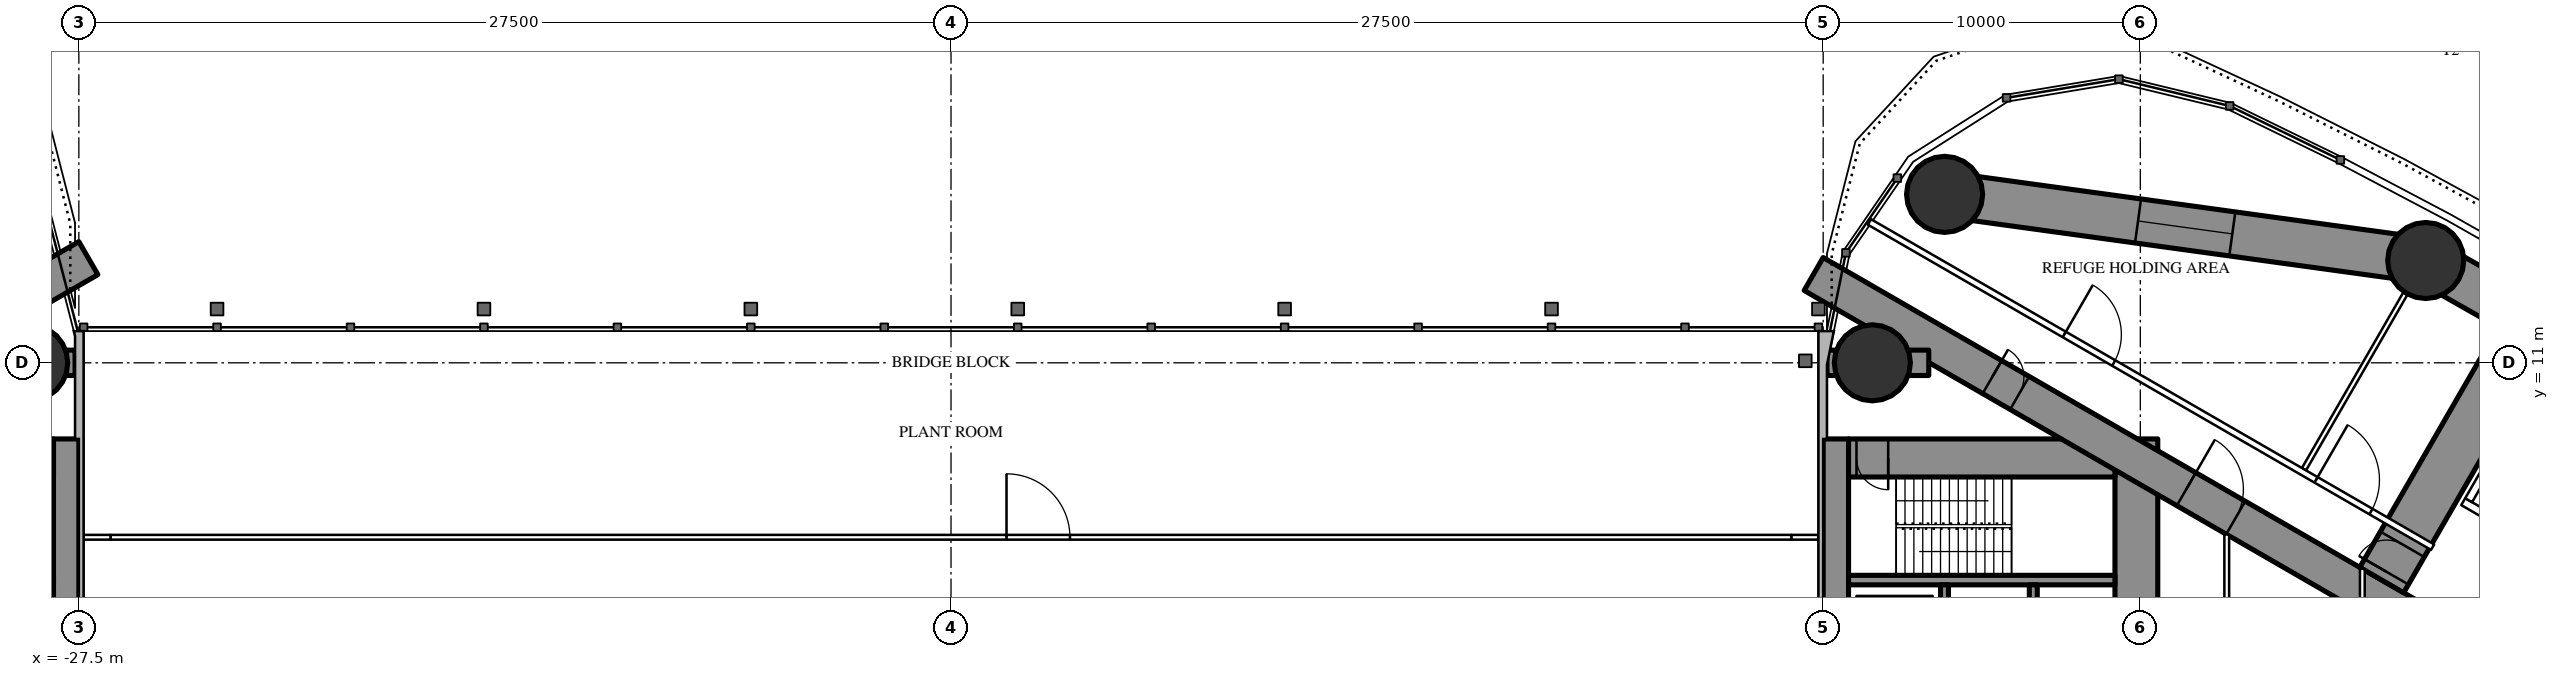
"""IFC4 building model, lengths in metres.
Left out: names, types, materials, properties, quantities, classifications, styles, units other than length and angle.
Written with IfcOpenShell. Run it as: python <this file> out.ifc"""

import sys

from ifc_helpers import new_model, si_unit, direction, frame, frame_2d, origin, origin_2d, place, context, subcontext, project, spatial, rectangle, circle, hollow_circle, extrude, element, fill, save


model = new_model("IFC4")
c1 = context("Model", 3, precision=1e-05, world=origin(), true_north=direction((0.0, 1.0)))
c2 = subcontext(c1, "Body", "Model", "MODEL_VIEW")
j1 = project(units=[si_unit("LENGTHUNIT", "METRE"), si_unit("PLANEANGLEUNIT", "RADIAN")], contexts=[c1])
p1 = place(None, origin())
s1 = spatial("IfcSite", under=j1, at=p1, CompositionType="ELEMENT")
p2 = place(p1, origin())
s2 = spatial("IfcBuilding", under=s1, at=p2, CompositionType="ELEMENT")
p3 = place(p2, frame((0.0, 0.0, 210.3)))
s3 = spatial("IfcBuildingStorey", under=s2, at=p3, CompositionType="ELEMENT", Elevation=210.3)
p4 = place(p3, frame((-29.05, 11.0, 0.0), z_axis=(0.0, 0.0, 1.0), x_axis=(1.0, 0.0, 0.0)))
e1 = element("IfcColumn", 1, at=p4, inside=s3, PredefinedType="COLUMN", context=c2, shape_type="SweptSolid", body=[
    extrude(hollow_circle(Radius=1.2, WallThickness=0.09, at=origin_2d()), origin(), (0.0, 0.0, 1.0), 5.0),
])
p5 = place(p3, frame((-27.9, 8.6, 0.0), z_axis=(0.0, 0.0, 1.0), x_axis=(0.0, -1.0, 0.0)))
e2 = element("IfcWall", 2, at=p5, inside=s3, PredefinedType="SHEAR", context=c2, shape_type="SweptSolid", body=[
    extrude(rectangle(XDim=17.2, YDim=0.8, at=frame_2d((8.6, 0.0))), origin(), (0.0, 0.0, 1.0), 5.0),
])
p6 = place(p5, frame((6.95, 0.0, 0.0)))
e3 = element("IfcOpeningElement", 3, at=p6, cuts=e2, PredefinedType="OPENING", context=c2, shape_type="SweptSolid", body=[
    extrude(rectangle(XDim=0.9, YDim=2.2, at=frame_2d((0.45, 1.1))), frame((0.0, 0.41, 0.0), z_axis=(0.0, -1.0, 0.0), x_axis=(1.0, 0.0, 0.0)), (0.0, 0.0, 1.0), 0.82),
])
p7 = place(p3, frame((-28.3, 8.0, 0.0), z_axis=(0.0, 0.0, 1.0), x_axis=(-1.0, 0.0, 0.0)))
e4 = element("IfcWall", 4, at=p7, inside=s3, PredefinedType="SHEAR", context=c2, shape_type="SweptSolid", body=[
    extrude(rectangle(XDim=8.4, YDim=1.2, at=frame_2d((4.2, 0.0))), origin(), (0.0, 0.0, 1.0), 5.0),
])
p8 = place(p7, frame((0.25, 0.0, 0.0)))
e5 = element("IfcOpeningElement", 5, at=p8, cuts=e4, PredefinedType="OPENING", context=c2, shape_type="SweptSolid", body=[
    extrude(rectangle(XDim=1.0, YDim=2.2, at=frame_2d((0.5, 1.1))), frame((0.0, 0.61, 0.0), z_axis=(0.0, -1.0, 0.0), x_axis=(1.0, 0.0, 0.0)), (0.0, 0.0, 1.0), 1.22),
])
p9 = place(p3, frame((-28.3, 4.15, 0.0), z_axis=(0.0, 0.0, 1.0), x_axis=(-1.0, 0.0, 0.0)))
e6 = element("IfcWall", 6, at=p9, inside=s3, PredefinedType="SHEAR", context=c2, shape_type="SweptSolid", body=[
    extrude(rectangle(XDim=8.4, YDim=0.3, at=frame_2d((4.2, 0.0))), origin(), (0.0, 0.0, 1.0), 5.0),
])
p10 = place(p3, frame((-27.2, 14.3, 0.0), z_axis=(0.0, 0.0, 1.0), x_axis=(-0.866026593062, -0.499997940104, 0.0)))
e7 = element("IfcWall", 7, at=p10, inside=s3, PredefinedType="SHEAR", context=c2, shape_type="SweptSolid", body=[
    extrude(rectangle(XDim=28.946, YDim=1.2, at=frame_2d((14.473, 0.0))), origin(), (0.0, 0.0, 1.0), 5.0),
])
p11 = place(p10, frame((6.5, 0.0, 0.0)))
e8 = element("IfcOpeningElement", 8, at=p11, cuts=e7, PredefinedType="OPENING", context=c2, shape_type="SweptSolid", body=[
    extrude(rectangle(XDim=1.0, YDim=2.2, at=frame_2d((0.5, 1.1))), frame((0.0, 0.61, 0.0), z_axis=(0.0, -1.0, 0.0), x_axis=(1.0, 0.0, 0.0)), (0.0, 0.0, 1.0), 1.22),
])
p12 = place(p10, frame((13.568, 0.0, 0.0)))
e9 = element("IfcOpeningElement", 9, at=p12, cuts=e7, PredefinedType="OPENING", context=c2, shape_type="SweptSolid", body=[
    extrude(rectangle(XDim=1.8, YDim=2.2, at=frame_2d((0.9, 1.1))), frame((0.0, 0.61, 0.0), z_axis=(0.0, -1.0, 0.0), x_axis=(1.0, 0.0, 0.0)), (0.0, 0.0, 1.0), 1.22),
])
p13 = place(p3, frame((-27.62, 11.0, 0.0), z_axis=(0.0, 0.0, 1.0), x_axis=(-1.0, 0.0, 0.0)))
e10 = element("IfcWall", 10, at=p13, inside=s3, PredefinedType="SHEAR", context=c2, shape_type="SweptSolid", body=[
    extrude(rectangle(XDim=4.076, YDim=0.8, at=frame_2d((2.038, 0.0))), origin(), (0.0, 0.0, 1.0), 5.0),
])
p14 = place(p3, frame((31.328, 16.311, 0.0), z_axis=(0.0, 0.0, 1.0), x_axis=(1.0, 0.0, 0.0)))
e11 = element("IfcColumn", 11, at=p14, inside=s3, PredefinedType="COLUMN", context=c2, shape_type="SweptSolid", body=[
    extrude(circle(Radius=1.2, at=origin_2d()), origin(), (0.0, 0.0, 1.0), 5.0),
])
p15 = place(p3, frame((29.05, 11.0, 0.0), z_axis=(0.0, 0.0, 1.0), x_axis=(1.0, 0.0, 0.0)))
e12 = element("IfcColumn", 12, at=p15, inside=s3, PredefinedType="COLUMN", context=c2, shape_type="SweptSolid", body=[
    extrude(hollow_circle(Radius=1.2, WallThickness=0.09, at=origin_2d()), origin(), (0.0, 0.0, 1.0), 5.0),
])
p16 = place(p3, frame((46.499, 14.226, 0.0), z_axis=(0.0, 0.0, 1.0), x_axis=(1.0, 0.0, 0.0)))
e13 = element("IfcColumn", 13, at=p16, inside=s3, PredefinedType="COLUMN", context=c2, shape_type="SweptSolid", body=[
    extrude(circle(Radius=1.2, at=origin_2d()), origin(), (0.0, 0.0, 1.0), 5.0),
])
p17 = place(p3, frame((27.9, -8.6, 0.0), z_axis=(0.0, 0.0, 1.0), x_axis=(0.0, 1.0, 0.0)))
e14 = element("IfcWall", 14, at=p17, inside=s3, PredefinedType="SHEAR", context=c2, shape_type="SweptSolid", body=[
    extrude(rectangle(XDim=17.2, YDim=0.8, at=frame_2d((8.6, 0.0))), origin(), (0.0, 0.0, 1.0), 5.0),
])
p18 = place(p17, frame((9.35, 0.0, 0.0)))
e15 = element("IfcOpeningElement", 15, at=p18, cuts=e14, PredefinedType="OPENING", context=c2, shape_type="SweptSolid", body=[
    extrude(rectangle(XDim=0.9, YDim=2.2, at=frame_2d((0.45, 1.1))), frame((0.0, 0.41, 0.0), z_axis=(0.0, -1.0, 0.0), x_axis=(1.0, 0.0, 0.0)), (0.0, 0.0, 1.0), 0.82),
])
p19 = place(p3, frame((37.375, -8.6, 0.0), z_axis=(0.0, 0.0, 1.0), x_axis=(0.0, 1.0, 0.0)))
e16 = element("IfcWall", 16, at=p19, inside=s3, PredefinedType="SHEAR", context=c2, shape_type="SweptSolid", body=[
    extrude(rectangle(XDim=17.2, YDim=1.35, at=frame_2d((8.6, 0.0))), origin(), (0.0, 0.0, 1.0), 5.0),
])
p20 = place(p19, frame((7.7, 0.0, 0.0)))
e17 = element("IfcOpeningElement", 17, at=p20, cuts=e16, PredefinedType="OPENING", context=c2, shape_type="SweptSolid", body=[
    extrude(rectangle(XDim=1.8, YDim=2.2, at=frame_2d((0.9, 1.1))), frame((0.0, 0.685, 0.0), z_axis=(0.0, -1.0, 0.0), x_axis=(1.0, 0.0, 0.0)), (0.0, 0.0, 1.0), 1.37),
])
p21 = place(p3, frame((28.3, 8.0, 0.0), z_axis=(0.0, 0.0, 1.0), x_axis=(1.0, 0.0, 0.0)))
e18 = element("IfcWall", 18, at=p21, inside=s3, PredefinedType="SHEAR", context=c2, shape_type="SweptSolid", body=[
    extrude(rectangle(XDim=8.4, YDim=1.2, at=frame_2d((4.2, 0.0))), origin(), (0.0, 0.0, 1.0), 5.0),
])
p22 = place(p21, frame((0.25, 0.0, 0.0)))
e19 = element("IfcOpeningElement", 19, at=p22, cuts=e18, PredefinedType="OPENING", context=c2, shape_type="SweptSolid", body=[
    extrude(rectangle(XDim=1.0, YDim=2.2, at=frame_2d((0.5, 1.1))), frame((0.0, 0.61, 0.0), z_axis=(0.0, -1.0, 0.0), x_axis=(1.0, 0.0, 0.0)), (0.0, 0.0, 1.0), 1.22),
])
p23 = place(p3, frame((28.3, 4.15, 0.0), z_axis=(0.0, 0.0, 1.0), x_axis=(1.0, 0.0, 0.0)))
e20 = element("IfcWall", 20, at=p23, inside=s3, PredefinedType="SHEAR", context=c2, shape_type="SweptSolid", body=[
    extrude(rectangle(XDim=8.4, YDim=0.3, at=frame_2d((4.2, 0.0))), origin(), (0.0, 0.0, 1.0), 5.0),
])
p24 = place(p3, frame((31.325, 1.9, 0.0), z_axis=(0.0, 0.0, 1.0), x_axis=(0.0, 1.0, 0.0)))
e21 = element("IfcWall", 21, at=p24, inside=s3, PredefinedType="SHEAR", context=c2, shape_type="SweptSolid", body=[
    extrude(rectangle(XDim=2.1, YDim=0.25, at=frame_2d((1.05, 0.0))), origin(), (0.0, 0.0, 1.0), 5.0),
])
p25 = place(p24, frame((0.5, 0.0, 0.0)))
e22 = element("IfcOpeningElement", 22, at=p25, cuts=e21, PredefinedType="OPENING", context=c2, shape_type="SweptSolid", body=[
    extrude(rectangle(XDim=1.1, YDim=2.2, at=frame_2d((0.55, 1.1))), frame((0.0, 0.135, 0.0), z_axis=(0.0, -1.0, 0.0), x_axis=(1.0, 0.0, 0.0)), (0.0, 0.0, 1.0), 0.27),
])
p26 = place(p3, frame((34.125, 1.65, 0.0), z_axis=(0.0, 0.0, 1.0), x_axis=(0.0, 1.0, 0.0)))
e23 = element("IfcWall", 23, at=p26, inside=s3, PredefinedType="SHEAR", context=c2, shape_type="SweptSolid", body=[
    extrude(rectangle(XDim=2.35, YDim=0.25, at=frame_2d((1.175, 0.0))), origin(), (0.0, 0.0, 1.0), 5.0),
])
p27 = place(p3, frame((27.2, 13.8, 0.0), z_axis=(0.0, 0.0, 1.0), x_axis=(0.866024515034, -0.500001539357, 0.0)))
e24 = element("IfcWall", 24, at=p27, inside=s3, PredefinedType="SHEAR", context=c2, shape_type="SweptSolid", body=[
    extrude(rectangle(XDim=26.907, YDim=1.2, at=frame_2d((13.454, 0.0))), origin(), (0.0, 0.0, 1.0), 5.0),
])
p28 = place(p27, frame((6.5, 0.0, 0.0)))
e25 = element("IfcOpeningElement", 25, at=p28, cuts=e24, PredefinedType="OPENING", context=c2, shape_type="SweptSolid", body=[
    extrude(rectangle(XDim=1.0, YDim=2.2, at=frame_2d((0.5, 1.1))), frame((0.0, 0.61, 0.0), z_axis=(0.0, -1.0, 0.0), x_axis=(1.0, 0.0, 0.0)), (0.0, 0.0, 1.0), 1.22),
])
p29 = place(p27, frame((13.568, 0.0, 0.0)))
e26 = element("IfcOpeningElement", 26, at=p29, cuts=e24, PredefinedType="OPENING", context=c2, shape_type="SweptSolid", body=[
    extrude(rectangle(XDim=1.8, YDim=2.2, at=frame_2d((0.9, 1.1))), frame((0.0, 0.61, 0.0), z_axis=(0.0, -1.0, 0.0), x_axis=(1.0, 0.0, 0.0)), (0.0, 0.0, 1.0), 1.22),
])
p30 = place(p3, frame((27.62, 11.0, 0.0), z_axis=(0.0, 0.0, 1.0), x_axis=(1.0, 0.0, 0.0)))
e27 = element("IfcWall", 27, at=p30, inside=s3, PredefinedType="SHEAR", context=c2, shape_type="SweptSolid", body=[
    extrude(rectangle(XDim=3.209, YDim=0.8, at=frame_2d((1.605, 0.0))), origin(), (0.0, 0.0, 1.0), 5.0),
])
p31 = place(p3, frame((45.111, 4.152, 0.0), z_axis=(0.0, 0.0, 1.0), x_axis=(0.499986466662, 0.86603321712, 0.0)))
e28 = element("IfcWall", 28, at=p31, inside=s3, PredefinedType="SHEAR", context=c2, shape_type="SweptSolid", body=[
    extrude(rectangle(XDim=9.446, YDim=1.6, at=frame_2d((4.723, 0.0))), origin(), (0.0, 0.0, 1.0), 5.0),
])
p32 = place(p31, frame((0.3, 0.0, 0.0)))
e29 = element("IfcOpeningElement", 29, at=p32, cuts=e28, PredefinedType="OPENING", context=c2, shape_type="SweptSolid", body=[
    extrude(rectangle(XDim=1.0, YDim=2.2, at=frame_2d((0.5, 1.1))), frame((0.0, 0.81, 0.0), z_axis=(0.0, -1.0, 0.0), x_axis=(1.0, 0.0, 0.0)), (0.0, 0.0, 1.0), 1.62),
])
p33 = place(p3, frame((49.834, 12.332, 0.0), z_axis=(0.0, 0.0, 1.0), x_axis=(-0.869560321562, 0.493826738001, 0.0)))
e30 = element("IfcWall", 30, at=p33, inside=s3, PredefinedType="SHEAR", context=c2, shape_type="SweptSolid", body=[
    extrude(rectangle(XDim=3.835, YDim=1.4, at=frame_2d((1.917, 0.0))), origin(), (0.0, 0.0, 1.0), 5.0),
])
p34 = place(p3, frame((46.499, 14.226, 0.0), z_axis=(0.0, 0.0, 1.0), x_axis=(-0.990685830783, 0.13616748762, 0.0)))
e31 = element("IfcWall", 31, at=p34, inside=s3, PredefinedType="SHEAR", context=c2, shape_type="SweptSolid", body=[
    extrude(rectangle(XDim=15.313, YDim=1.4, at=frame_2d((7.657, 0.0))), origin(), (0.0, 0.0, 1.0), 5.0),
])
p35 = place(p34, frame((6.157, 0.0, 0.6)))
e32 = element("IfcOpeningElement", 32, at=p35, cuts=e31, PredefinedType="OPENING", context=c2, shape_type="SweptSolid", body=[
    extrude(rectangle(XDim=3.0, YDim=1.2, at=frame_2d((1.5, 0.6))), frame((0.0, 0.71, 0.0), z_axis=(0.0, -1.0, 0.0), x_axis=(1.0, 0.0, 0.0)), (0.0, 0.0, 1.0), 1.42),
])
p36 = place(p3, frame((42.66, 7.646, 0.0), z_axis=(0.0, 0.0, 1.0), x_axis=(0.499996592859, 0.866027370889, 0.0)))
e33 = element("IfcWall", 33, at=p36, inside=s3, PredefinedType="PARTITIONING", context=c2, shape_type="SweptSolid", body=[
    extrude(rectangle(XDim=6.398, YDim=0.15, at=frame_2d((3.199, 0.0))), origin(), (0.0, 0.0, 1.0), 3.85),
])
p37 = place(p3, frame((28.959, 15.44, 0.0), z_axis=(0.0, 0.0, 1.0), x_axis=(0.866028936079, -0.499993881836, 0.0)))
e34 = element("IfcWall", 34, at=p37, inside=s3, PredefinedType="PARTITIONING", context=c2, shape_type="SweptSolid", body=[
    extrude(rectangle(XDim=20.503, YDim=0.2, at=frame_2d((10.251, 0.0))), origin(), (0.0, 0.0, 1.0), 4.75),
])
p38 = place(p37, frame((16.26, 0.0, 0.0)))
e35 = element("IfcOpeningElement", 35, at=p38, cuts=e34, PredefinedType="OPENING", context=c2, shape_type="SweptSolid", body=[
    extrude(rectangle(XDim=2.0, YDim=2.4, at=frame_2d((1.0, 1.2))), frame((0.0, 0.11, 0.0), z_axis=(0.0, -1.0, 0.0), x_axis=(1.0, 0.0, 0.0)), (0.0, 0.0, 1.0), 0.22),
])
p39 = place(p37, frame((7.094, 0.0, 0.0)))
e36 = element("IfcOpeningElement", 36, at=p39, cuts=e34, PredefinedType="OPENING", context=c2, shape_type="SweptSolid", body=[
    extrude(rectangle(XDim=1.8, YDim=2.2, at=frame_2d((0.9, 1.1))), frame((0.0, 0.11, 0.0), z_axis=(0.0, -1.0, 0.0), x_axis=(1.0, 0.0, 0.0)), (0.0, 0.0, 1.0), 0.22),
])
p40 = place(p3, frame((40.225, -5.587, 0.0), z_axis=(0.0, 0.0, 1.0), x_axis=(0.0, 1.0, 0.0)))
e37 = element("IfcWall", 37, at=p40, inside=s3, PredefinedType="PARTITIONING", context=c2, shape_type="SweptSolid", body=[
    extrude(rectangle(XDim=11.174, YDim=0.15, at=frame_2d((5.587, 0.0))), origin(), (0.0, 0.0, 1.0), 4.75),
])
p41 = place(p40, frame((4.687, 0.0, 0.0)))
e38 = element("IfcOpeningElement", 38, at=p41, cuts=e37, PredefinedType="OPENING", context=c2, shape_type="SweptSolid", body=[
    extrude(rectangle(XDim=1.8, YDim=2.2, at=frame_2d((0.9, 1.1))), frame((0.0, 0.085, 0.0), z_axis=(0.0, -1.0, 0.0), x_axis=(1.0, 0.0, 0.0)), (0.0, 0.0, 1.0), 0.17),
])
p42 = place(p3, frame((44.5, -4.505, 0.0), z_axis=(0.0, 0.0, 1.0), x_axis=(0.0, 1.0, 0.0)))
e39 = element("IfcWall", 39, at=p42, inside=s3, PredefinedType="PARTITIONING", context=c2, shape_type="SweptSolid", body=[
    extrude(rectangle(XDim=9.009, YDim=0.15, at=frame_2d((4.505, 0.0))), origin(), (0.0, 0.0, 1.0), 4.75),
])
p43 = place(p42, frame((4.005, 0.0, 0.0)))
e40 = element("IfcOpeningElement", 40, at=p43, cuts=e39, PredefinedType="OPENING", context=c2, shape_type="SweptSolid", body=[
    extrude(rectangle(XDim=1.0, YDim=2.2, at=frame_2d((0.5, 1.1))), frame((0.0, 0.085, 0.0), z_axis=(0.0, -1.0, 0.0), x_axis=(1.0, 0.0, 0.0)), (0.0, 0.0, 1.0), 0.17),
])
p44 = place(p3, frame((-26.5, 5.5, 0.0), z_axis=(0.0, 0.0, 1.0), x_axis=(1.0, 0.0, 0.0)))
e41 = element("IfcWall", 41, at=p44, inside=s3, PredefinedType="PARTITIONING", context=c2, shape_type="SweptSolid", body=[
    extrude(rectangle(XDim=53.0, YDim=0.15, at=frame_2d((26.5, 0.0))), origin(), (0.0, 0.0, 1.0), 4.03),
])
p45 = place(p44, frame((28.25, 0.0, 0.0)))
e42 = element("IfcOpeningElement", 42, at=p45, cuts=e41, PredefinedType="OPENING", context=c2, shape_type="SweptSolid", body=[
    extrude(rectangle(XDim=2.0, YDim=2.4, at=frame_2d((1.0, 1.2))), frame((0.0, 0.085, 0.0), z_axis=(0.0, -1.0, 0.0), x_axis=(1.0, 0.0, 0.0)), (0.0, 0.0, 1.0), 0.17),
])
for number, where, z_axis, x_axis in (
    (43, (-27.35, 5.5, 0.0), (0.0, 0.0, 1.0), (1.0, 0.0, 0.0)),
    (44, (26.5, 5.5, 0.0), (0.0, 0.0, 1.0), (1.0, 0.0, 0.0)),
):
    element("IfcWall", number, at=place(p3, frame(where, z_axis=z_axis, x_axis=x_axis)), inside=s3, PredefinedType="PARTITIONING", context=c2, shape_type="SweptSolid", body=[
        extrude(rectangle(XDim=0.85, YDim=0.15, at=frame_2d((0.425, 0.0))), origin(), (0.0, 0.0, 1.0), 3.8),
    ])
p46 = place(p3, frame((47.681, 6.622, 0.0), z_axis=(0.0, 0.0, 1.0), x_axis=(0.86603344179, -0.499986077507, 0.0)))
e45 = element("IfcWall", 45, at=p46, inside=s3, PredefinedType="PARTITIONING", context=c2, shape_type="SweptSolid", body=[
    extrude(rectangle(XDim=6.6, YDim=0.25, at=frame_2d((3.3, 0.0))), origin(), (0.0, 0.0, 1.0), 4.75),
])
p47 = place(p3, frame((47.852, 6.668, 0.0), z_axis=(0.0, 0.0, 1.0), x_axis=(0.499929347863, 0.866066190972, 0.0)))
e46 = element("IfcWall", 46, at=p47, inside=s3, PredefinedType="PARTITIONING", context=c2, shape_type="SweptSolid", body=[
    extrude(rectangle(XDim=3.201, YDim=0.25, at=frame_2d((1.6, 0.0))), origin(), (0.0, 0.0, 1.0), 4.75),
])
p48 = place(p35, origin())
e47 = element("IfcWindow", 47, at=p48, inside=s3, PartitioningType="SINGLE_PANEL", PredefinedType="WINDOW", context=c2, shape_type="SweptSolid", body=[
    extrude(rectangle(XDim=3.0, YDim=1.2, at=frame_2d((1.5, 0.6))), frame((0.0, 0.03, 0.0), z_axis=(0.0, -1.0, 0.0), x_axis=(1.0, 0.0, 0.0)), (0.0, 0.0, 1.0), 0.06),
])
fill(e32, e47)
p49 = place(p32, origin())
e48 = element("IfcDoor", 48, at=p49, inside=s3, OperationType="SINGLE_SWING_LEFT", PredefinedType="DOOR", context=c2, shape_type="SweptSolid", body=[
    extrude(rectangle(XDim=1.0, YDim=2.2, at=frame_2d((0.5, 1.1))), frame((0.0, 0.025, 0.0), z_axis=(0.0, -1.0, 0.0), x_axis=(1.0, 0.0, 0.0)), (0.0, 0.0, 1.0), 0.05),
])
fill(e29, e48)
p50 = place(p38, origin())
e49 = element("IfcDoor", 49, at=p50, inside=s3, OperationType="DOUBLE_DOOR_SINGLE_SWING", PredefinedType="DOOR", context=c2, shape_type="SweptSolid", body=[
    extrude(rectangle(XDim=2.0, YDim=2.4, at=frame_2d((1.0, 1.2))), frame((0.0, 0.025, 0.0), z_axis=(0.0, -1.0, 0.0), x_axis=(1.0, 0.0, 0.0)), (0.0, 0.0, 1.0), 0.05),
])
fill(e35, e49)
p51 = place(p39, origin())
e50 = element("IfcDoor", 50, at=p51, inside=s3, OperationType="DOUBLE_DOOR_SINGLE_SWING", PredefinedType="DOOR", context=c2, shape_type="SweptSolid", body=[
    extrude(rectangle(XDim=1.8, YDim=2.2, at=frame_2d((0.9, 1.1))), frame((0.0, 0.025, 0.0), z_axis=(0.0, -1.0, 0.0), x_axis=(1.0, 0.0, 0.0)), (0.0, 0.0, 1.0), 0.05),
])
fill(e36, e50)
p52 = place(p28, origin())
e51 = element("IfcDoor", 51, at=p52, inside=s3, OperationType="SINGLE_SWING_LEFT", PredefinedType="DOOR", context=c2, shape_type="SweptSolid", body=[
    extrude(rectangle(XDim=1.0, YDim=2.2, at=frame_2d((0.5, 1.1))), frame((0.0, 0.025, 0.0), z_axis=(0.0, -1.0, 0.0), x_axis=(1.0, 0.0, 0.0)), (0.0, 0.0, 1.0), 0.05),
])
fill(e25, e51)
p53 = place(p29, origin())
e52 = element("IfcDoor", 52, at=p53, inside=s3, OperationType="DOUBLE_DOOR_SINGLE_SWING", PredefinedType="DOOR", context=c2, shape_type="SweptSolid", body=[
    extrude(rectangle(XDim=1.8, YDim=2.2, at=frame_2d((0.9, 1.1))), frame((0.0, 0.025, 0.0), z_axis=(0.0, -1.0, 0.0), x_axis=(1.0, 0.0, 0.0)), (0.0, 0.0, 1.0), 0.05),
])
fill(e26, e52)
p54 = place(p22, origin())
e53 = element("IfcDoor", 53, at=p54, inside=s3, OperationType="SINGLE_SWING_RIGHT", PredefinedType="DOOR", context=c2, shape_type="SweptSolid", body=[
    extrude(rectangle(XDim=1.0, YDim=2.2, at=frame_2d((0.5, 1.1))), frame((0.0, 0.025, 0.0), z_axis=(0.0, -1.0, 0.0), x_axis=(1.0, 0.0, 0.0)), (0.0, 0.0, 1.0), 0.05),
])
fill(e19, e53)
p55 = place(p45, origin())
e54 = element("IfcDoor", 54, at=p55, inside=s3, OperationType="DOUBLE_DOOR_SINGLE_SWING", PredefinedType="DOOR", context=c2, shape_type="SweptSolid", body=[
    extrude(rectangle(XDim=2.0, YDim=2.4, at=frame_2d((1.0, 1.2))), frame((0.0, 0.025, 0.0), z_axis=(0.0, -1.0, 0.0), x_axis=(1.0, 0.0, 0.0)), (0.0, 0.0, 1.0), 0.05),
])
fill(e42, e54)
save(model, sys.argv[1])
